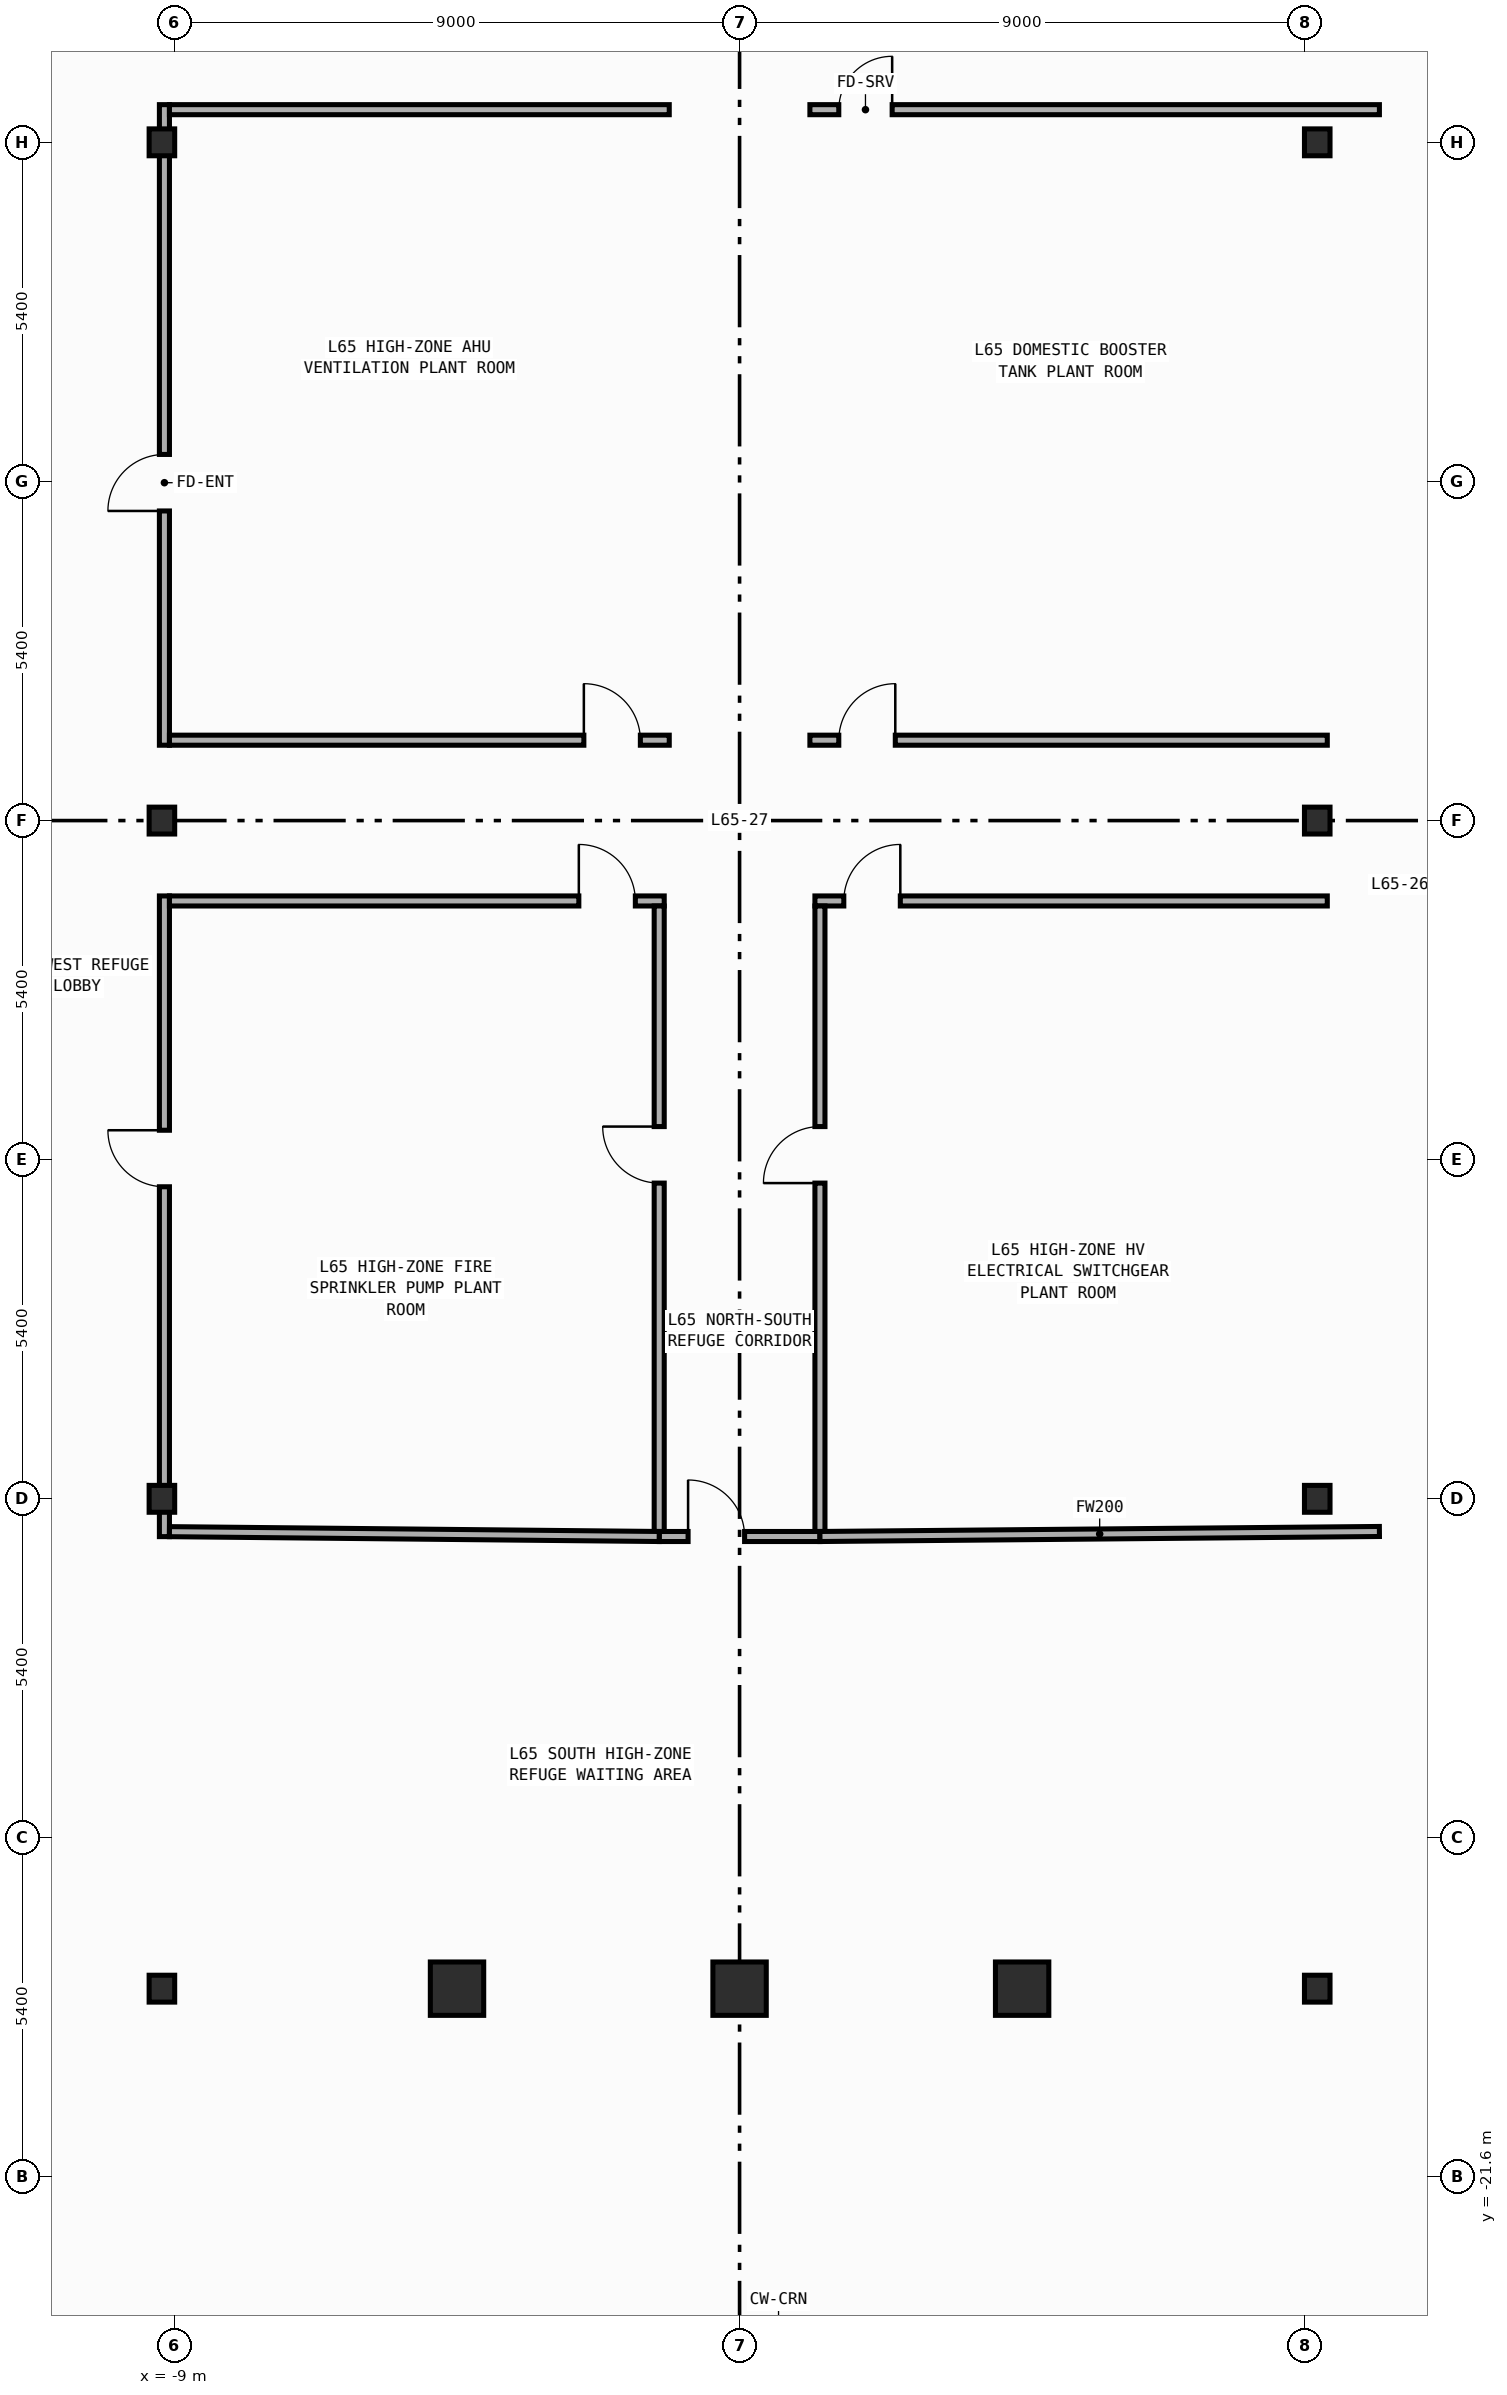
"""IFC4 building model, lengths in metres.
Left out: names, types, materials, properties, quantities, classifications, styles, units other than length and angle.
Written with IfcOpenShell. Run it as: python <this file> out.ifc"""

import sys

from ifc_helpers import new_model, si_unit, direction, frame, frame_2d, origin, origin_2d, place, context, subcontext, project, spatial, rectangle, i_section, extrude, element, fill, save


model = new_model("IFC4")
c1 = context("Model", 3, precision=1e-05, world=origin(), true_north=direction((0.0, 1.0)))
c2 = subcontext(c1, "Body", "Model", "MODEL_VIEW")
j1 = project(units=[si_unit("LENGTHUNIT", "METRE"), si_unit("PLANEANGLEUNIT", "RADIAN")], contexts=[c1])
p1 = place(None, origin())
s1 = spatial("IfcSite", under=j1, at=p1, CompositionType="ELEMENT")
p2 = place(p1, origin())
s2 = spatial("IfcBuilding", under=s1, at=p2, CompositionType="ELEMENT")
p3 = place(p2, frame((0.0, 0.0, 272.8)))
s3 = spatial("IfcBuildingStorey", under=s2, at=p3, CompositionType="ELEMENT", Elevation=272.8)
for number, where, z_axis, x_axis in (
    (1, (-9.2, -18.6, 0.0), (0.0, 0.0, 1.0), (1.0, 0.0, 0.0)),
    (2, (-9.2, -10.8, 0.0), (0.0, 0.0, 1.0), (1.0, 0.0, 0.0)),
    (3, (-9.2, 0.0, 0.0), (0.0, 0.0, 1.0), (1.0, 0.0, 0.0)),
    (4, (-9.2, 10.8, 0.0), (0.0, 0.0, 1.0), (1.0, 0.0, 0.0)),
    (5, (9.2, -18.6, 0.0), (0.0, 0.0, 1.0), (1.0, 0.0, 0.0)),
    (6, (9.2, -10.8, 0.0), (0.0, 0.0, 1.0), (1.0, 0.0, 0.0)),
    (7, (9.2, 0.0, 0.0), (0.0, 0.0, 1.0), (1.0, 0.0, 0.0)),
    (8, (9.2, 10.8, 0.0), (0.0, 0.0, 1.0), (1.0, 0.0, 0.0)),
):
    element("IfcColumn", number, at=place(p3, frame(where, z_axis=z_axis, x_axis=x_axis)), inside=s3, PredefinedType="COLUMN", context=c2, shape_type="SweptSolid", body=[
        extrude(i_section(OverallWidth=0.407, OverallDepth=0.428, WebThickness=0.02, FlangeThickness=0.035, FilletRadius=0.022, at=origin_2d()), origin(), (0.0, 0.0, 1.0), 4.8),
    ])
for number, where, z_axis, x_axis in (
    (9, (-4.5, -18.6, 0.0), (0.0, 0.0, 1.0), (1.0, 0.0, 0.0)),
    (10, (0.0, -18.6, 0.0), (0.0, 0.0, 1.0), (1.0, 0.0, 0.0)),
    (11, (4.5, -18.6, 0.0), (0.0, 0.0, 1.0), (1.0, 0.0, 0.0)),
):
    element("IfcColumn", number, at=place(p3, frame(where, z_axis=z_axis, x_axis=x_axis)), inside=s3, PredefinedType="COLUMN", context=c2, shape_type="SweptSolid", body=[
        extrude(rectangle(XDim=0.85, YDim=0.85, at=origin_2d()), origin(), (0.0, 0.0, 1.0), 4.8),
    ])
p4 = place(p3, frame((-9.16, 1.2, 0.0), z_axis=(0.0, 0.0, 1.0), x_axis=(0.0, 1.0, 0.0)))
e12 = element("IfcWall", 12, at=p4, inside=s3, PredefinedType="PARTITIONING", context=c2, shape_type="SweptSolid", body=[
    extrude(rectangle(XDim=10.2, YDim=0.16, at=frame_2d((5.1, 0.0))), origin(), (0.0, 0.0, 1.0), 3.64),
])
p5 = place(p4, frame((3.73, 0.0, 0.0)))
e13 = element("IfcOpeningElement", 13, at=p5, cuts=e12, PredefinedType="OPENING", context=c2, shape_type="SweptSolid", body=[
    extrude(rectangle(XDim=0.9, YDim=2.15, at=frame_2d((0.45, 1.075))), frame((0.0, 0.09, 0.0), z_axis=(0.0, -1.0, 0.0), x_axis=(1.0, 0.0, 0.0)), (0.0, 0.0, 1.0), 0.18),
])
p6 = place(p3, frame((-9.16, -11.402, 0.0), z_axis=(0.0, 0.0, 1.0), x_axis=(0.0, 1.0, 0.0)))
e14 = element("IfcWall", 14, at=p6, inside=s3, PredefinedType="PARTITIONING", context=c2, shape_type="SweptSolid", body=[
    extrude(rectangle(XDim=10.202, YDim=0.16, at=frame_2d((5.101, 0.0))), origin(), (0.0, 0.0, 1.0), 3.64),
])
p7 = place(p6, frame((5.571, 0.0, 0.0)))
e15 = element("IfcOpeningElement", 15, at=p7, cuts=e14, PredefinedType="OPENING", context=c2, shape_type="SweptSolid", body=[
    extrude(rectangle(XDim=0.9, YDim=2.15, at=frame_2d((0.45, 1.075))), frame((0.0, 0.09, 0.0), z_axis=(0.0, -1.0, 0.0), x_axis=(1.0, 0.0, 0.0)), (0.0, 0.0, 1.0), 0.18),
])
p8 = place(p3, frame((-9.08, 1.28, 0.0), z_axis=(0.0, 0.0, 1.0), x_axis=(1.0, 0.0, 0.0)))
e16 = element("IfcWall", 16, at=p8, inside=s3, PredefinedType="PARTITIONING", context=c2, shape_type="SweptSolid", body=[
    extrude(rectangle(XDim=7.96, YDim=0.16, at=frame_2d((3.98, 0.0))), origin(), (0.0, 0.0, 1.0), 4.54),
])
p9 = place(p8, frame((6.6, 0.0, 0.0)))
e17 = element("IfcOpeningElement", 17, at=p9, cuts=e16, PredefinedType="OPENING", context=c2, shape_type="SweptSolid", body=[
    extrude(rectangle(XDim=0.9, YDim=2.15, at=frame_2d((0.45, 1.075))), frame((0.0, 0.09, 0.0), z_axis=(0.0, -1.0, 0.0), x_axis=(1.0, 0.0, 0.0)), (0.0, 0.0, 1.0), 0.18),
])
p10 = place(p3, frame((1.12, 1.28, 0.0), z_axis=(0.0, 0.0, 1.0), x_axis=(1.0, 0.0, 0.0)))
e18 = element("IfcWall", 18, at=p10, inside=s3, PredefinedType="PARTITIONING", context=c2, shape_type="SweptSolid", body=[
    extrude(rectangle(XDim=8.24, YDim=0.16, at=frame_2d((4.12, 0.0))), origin(), (0.0, 0.0, 1.0), 4.54),
])
p11 = place(p10, frame((0.46, 0.0, 0.0)))
e19 = element("IfcOpeningElement", 19, at=p11, cuts=e18, PredefinedType="OPENING", context=c2, shape_type="SweptSolid", body=[
    extrude(rectangle(XDim=0.9, YDim=2.15, at=frame_2d((0.45, 1.075))), frame((0.0, 0.09, 0.0), z_axis=(0.0, -1.0, 0.0), x_axis=(1.0, 0.0, 0.0)), (0.0, 0.0, 1.0), 0.18),
])
p12 = place(p3, frame((-9.08, -1.28, 0.0), z_axis=(0.0, 0.0, 1.0), x_axis=(1.0, 0.0, 0.0)))
e20 = element("IfcWall", 20, at=p12, inside=s3, PredefinedType="PARTITIONING", context=c2, shape_type="SweptSolid", body=[
    extrude(rectangle(XDim=7.88, YDim=0.16, at=frame_2d((3.94, 0.0))), origin(), (0.0, 0.0, 1.0), 4.54),
])
p13 = place(p12, frame((6.52, 0.0, 0.0)))
e21 = element("IfcOpeningElement", 21, at=p13, cuts=e20, PredefinedType="OPENING", context=c2, shape_type="SweptSolid", body=[
    extrude(rectangle(XDim=0.9, YDim=2.15, at=frame_2d((0.45, 1.075))), frame((0.0, 0.09, 0.0), z_axis=(0.0, -1.0, 0.0), x_axis=(1.0, 0.0, 0.0)), (0.0, 0.0, 1.0), 0.18),
])
p14 = place(p3, frame((1.2, -1.28, 0.0), z_axis=(0.0, 0.0, 1.0), x_axis=(1.0, 0.0, 0.0)))
e22 = element("IfcWall", 22, at=p14, inside=s3, PredefinedType="PARTITIONING", context=c2, shape_type="SweptSolid", body=[
    extrude(rectangle(XDim=8.16, YDim=0.16, at=frame_2d((4.08, 0.0))), origin(), (0.0, 0.0, 1.0), 4.54),
])
p15 = place(p14, frame((0.46, 0.0, 0.0)))
e23 = element("IfcOpeningElement", 23, at=p15, cuts=e22, PredefinedType="OPENING", context=c2, shape_type="SweptSolid", body=[
    extrude(rectangle(XDim=0.9, YDim=2.15, at=frame_2d((0.45, 1.075))), frame((0.0, 0.09, 0.0), z_axis=(0.0, -1.0, 0.0), x_axis=(1.0, 0.0, 0.0)), (0.0, 0.0, 1.0), 0.18),
])
p16 = place(p3, frame((-1.28, -11.4, 0.0), z_axis=(0.0, 0.0, 1.0), x_axis=(1.0, 0.0, 0.0)))
e24 = element("IfcWall", 24, at=p16, inside=s3, PredefinedType="PARTITIONING", context=c2, shape_type="SweptSolid", body=[
    extrude(rectangle(XDim=2.56, YDim=0.16, at=frame_2d((1.28, 0.0))), origin(), (0.0, 0.0, 1.0), 4.54),
])
p17 = place(p16, frame((0.46, 0.0, 0.0)))
e25 = element("IfcOpeningElement", 25, at=p17, cuts=e24, PredefinedType="OPENING", context=c2, shape_type="SweptSolid", body=[
    extrude(rectangle(XDim=0.9, YDim=2.15, at=frame_2d((0.45, 1.075))), frame((0.0, 0.09, 0.0), z_axis=(0.0, -1.0, 0.0), x_axis=(1.0, 0.0, 0.0)), (0.0, 0.0, 1.0), 0.18),
])
p18 = place(p3, frame((-1.28, -11.32, 0.0), z_axis=(0.0, 0.0, 1.0), x_axis=(0.0, 1.0, 0.0)))
e26 = element("IfcWall", 26, at=p18, inside=s3, PredefinedType="PARTITIONING", context=c2, shape_type="SweptSolid", body=[
    extrude(rectangle(XDim=9.96, YDim=0.16, at=frame_2d((4.98, 0.0))), origin(), (0.0, 0.0, 1.0), 4.54),
])
p19 = place(p18, frame((5.548, 0.0, 0.0)))
e27 = element("IfcOpeningElement", 27, at=p19, cuts=e26, PredefinedType="OPENING", context=c2, shape_type="SweptSolid", body=[
    extrude(rectangle(XDim=0.9, YDim=2.15, at=frame_2d((0.45, 1.075))), frame((0.0, 0.09, 0.0), z_axis=(0.0, -1.0, 0.0), x_axis=(1.0, 0.0, 0.0)), (0.0, 0.0, 1.0), 0.18),
])
p20 = place(p3, frame((1.28, -11.32, 0.0), z_axis=(0.0, 0.0, 1.0), x_axis=(0.0, 1.0, 0.0)))
e28 = element("IfcWall", 28, at=p20, inside=s3, PredefinedType="PARTITIONING", context=c2, shape_type="SweptSolid", body=[
    extrude(rectangle(XDim=9.96, YDim=0.16, at=frame_2d((4.98, 0.0))), origin(), (0.0, 0.0, 1.0), 4.54),
])
p21 = place(p20, frame((5.548, 0.0, 0.0)))
e29 = element("IfcOpeningElement", 29, at=p21, cuts=e28, PredefinedType="OPENING", context=c2, shape_type="SweptSolid", body=[
    extrude(rectangle(XDim=0.9, YDim=2.15, at=frame_2d((0.45, 1.075))), frame((0.0, 0.09, 0.0), z_axis=(0.0, -1.0, 0.0), x_axis=(1.0, 0.0, 0.0)), (0.0, 0.0, 1.0), 0.18),
])
p22 = place(p3, frame((-9.08, 11.32, 0.0), z_axis=(0.0, 0.0, 1.0), x_axis=(1.0, 0.0, 0.0)))
e30 = element("IfcWall", 30, at=p22, inside=s3, PredefinedType="PARTITIONING", context=c2, shape_type="SweptSolid", body=[
    extrude(rectangle(XDim=7.96, YDim=0.16, at=frame_2d((3.98, 0.0))), origin(), (0.0, 0.0, 1.0), 4.54),
])
p23 = place(p3, frame((1.12, 11.32, 0.0), z_axis=(0.0, 0.0, 1.0), x_axis=(1.0, 0.0, 0.0)))
e31 = element("IfcWall", 31, at=p23, inside=s3, PredefinedType="PARTITIONING", context=c2, shape_type="SweptSolid", body=[
    extrude(rectangle(XDim=9.07, YDim=0.16, at=frame_2d((4.535, 0.0))), origin(), (0.0, 0.0, 1.0), 4.54),
])
p24 = place(p23, frame((0.46, 0.0, 0.0)))
e32 = element("IfcOpeningElement", 32, at=p24, cuts=e31, PredefinedType="OPENING", context=c2, shape_type="SweptSolid", body=[
    extrude(rectangle(XDim=0.85, YDim=2.1, at=frame_2d((0.425, 1.05))), frame((0.0, 0.09, 0.0), z_axis=(0.0, -1.0, 0.0), x_axis=(1.0, 0.0, 0.0)), (0.0, 0.0, 1.0), 0.18),
])
p25 = place(p3, frame((-9.08, -11.323, 0.0), z_axis=(0.0, 0.0, 1.0), x_axis=(0.999951089988, -0.009890279647, 0.0)))
e33 = element("IfcWall", 33, at=p25, inside=s3, PredefinedType="PARTITIONING", context=c2, shape_type="SweptSolid", body=[
    extrude(rectangle(XDim=7.801, YDim=0.16, at=frame_2d((3.9, 0.0))), origin(), (0.0, 0.0, 1.0), 4.54),
])
p26 = place(p3, frame((1.28, -11.4, 0.0), z_axis=(0.0, 0.0, 1.0), x_axis=(0.999959860438, 0.008959771869, 0.0)))
e34 = element("IfcWall", 34, at=p26, inside=s3, PredefinedType="PARTITIONING", context=c2, shape_type="SweptSolid", body=[
    extrude(rectangle(XDim=8.91, YDim=0.16, at=frame_2d((4.455, 0.0))), origin(), (0.0, 0.0, 1.0), 4.54),
])
p27 = place(p5, origin())
e35 = element("IfcDoor", 35, at=p27, inside=s3, OperationType="SINGLE_SWING_LEFT", PredefinedType="DOOR", context=c2, shape_type="SweptSolid", body=[
    extrude(rectangle(XDim=0.9, YDim=2.15, at=frame_2d((0.45, 1.075))), frame((0.0, 0.025, 0.0), z_axis=(0.0, -1.0, 0.0), x_axis=(1.0, 0.0, 0.0)), (0.0, 0.0, 1.0), 0.05),
])
fill(e13, e35)
p28 = place(p7, origin())
e36 = element("IfcDoor", 36, at=p28, inside=s3, OperationType="SINGLE_SWING_RIGHT", PredefinedType="DOOR", context=c2, shape_type="SweptSolid", body=[
    extrude(rectangle(XDim=0.9, YDim=2.15, at=frame_2d((0.45, 1.075))), frame((0.0, 0.025, 0.0), z_axis=(0.0, -1.0, 0.0), x_axis=(1.0, 0.0, 0.0)), (0.0, 0.0, 1.0), 0.05),
])
fill(e15, e36)
p29 = place(p9, origin())
e37 = element("IfcDoor", 37, at=p29, inside=s3, OperationType="SINGLE_SWING_LEFT", PredefinedType="DOOR", context=c2, shape_type="SweptSolid", body=[
    extrude(rectangle(XDim=0.9, YDim=2.15, at=frame_2d((0.45, 1.075))), frame((0.0, 0.025, 0.0), z_axis=(0.0, -1.0, 0.0), x_axis=(1.0, 0.0, 0.0)), (0.0, 0.0, 1.0), 0.05),
])
fill(e17, e37)
p30 = place(p11, origin())
e38 = element("IfcDoor", 38, at=p30, inside=s3, OperationType="SINGLE_SWING_RIGHT", PredefinedType="DOOR", context=c2, shape_type="SweptSolid", body=[
    extrude(rectangle(XDim=0.9, YDim=2.15, at=frame_2d((0.45, 1.075))), frame((0.0, 0.025, 0.0), z_axis=(0.0, -1.0, 0.0), x_axis=(1.0, 0.0, 0.0)), (0.0, 0.0, 1.0), 0.05),
])
fill(e19, e38)
p31 = place(p13, origin())
e39 = element("IfcDoor", 39, at=p31, inside=s3, OperationType="SINGLE_SWING_LEFT", PredefinedType="DOOR", context=c2, shape_type="SweptSolid", body=[
    extrude(rectangle(XDim=0.9, YDim=2.15, at=frame_2d((0.45, 1.075))), frame((0.0, 0.025, 0.0), z_axis=(0.0, -1.0, 0.0), x_axis=(1.0, 0.0, 0.0)), (0.0, 0.0, 1.0), 0.05),
])
fill(e21, e39)
p32 = place(p15, origin())
e40 = element("IfcDoor", 40, at=p32, inside=s3, OperationType="SINGLE_SWING_RIGHT", PredefinedType="DOOR", context=c2, shape_type="SweptSolid", body=[
    extrude(rectangle(XDim=0.9, YDim=2.15, at=frame_2d((0.45, 1.075))), frame((0.0, 0.025, 0.0), z_axis=(0.0, -1.0, 0.0), x_axis=(1.0, 0.0, 0.0)), (0.0, 0.0, 1.0), 0.05),
])
fill(e23, e40)
p33 = place(p17, origin())
e41 = element("IfcDoor", 41, at=p33, inside=s3, OperationType="SINGLE_SWING_LEFT", PredefinedType="DOOR", context=c2, shape_type="SweptSolid", body=[
    extrude(rectangle(XDim=0.9, YDim=2.15, at=frame_2d((0.45, 1.075))), frame((0.0, 0.025, 0.0), z_axis=(0.0, -1.0, 0.0), x_axis=(1.0, 0.0, 0.0)), (0.0, 0.0, 1.0), 0.05),
])
fill(e25, e41)
p34 = place(p19, origin())
e42 = element("IfcDoor", 42, at=p34, inside=s3, OperationType="SINGLE_SWING_RIGHT", PredefinedType="DOOR", context=c2, shape_type="SweptSolid", body=[
    extrude(rectangle(XDim=0.9, YDim=2.15, at=frame_2d((0.45, 1.075))), frame((0.0, 0.025, 0.0), z_axis=(0.0, -1.0, 0.0), x_axis=(1.0, 0.0, 0.0)), (0.0, 0.0, 1.0), 0.05),
])
fill(e27, e42)
p35 = place(p21, origin())
e43 = element("IfcDoor", 43, at=p35, inside=s3, OperationType="SINGLE_SWING_LEFT", PredefinedType="DOOR", context=c2, shape_type="SweptSolid", body=[
    extrude(rectangle(XDim=0.9, YDim=2.15, at=frame_2d((0.45, 1.075))), frame((0.0, 0.025, 0.0), z_axis=(0.0, -1.0, 0.0), x_axis=(1.0, 0.0, 0.0)), (0.0, 0.0, 1.0), 0.05),
])
fill(e29, e43)
p36 = place(p24, origin())
e44 = element("IfcDoor", 44, at=p36, inside=s3, OperationType="SINGLE_SWING_RIGHT", PredefinedType="DOOR", context=c2, shape_type="SweptSolid", body=[
    extrude(rectangle(XDim=0.85, YDim=2.1, at=frame_2d((0.425, 1.05))), frame((0.0, 0.025, 0.0), z_axis=(0.0, -1.0, 0.0), x_axis=(1.0, 0.0, 0.0)), (0.0, 0.0, 1.0), 0.05),
])
fill(e32, e44)
save(model, sys.argv[1])
